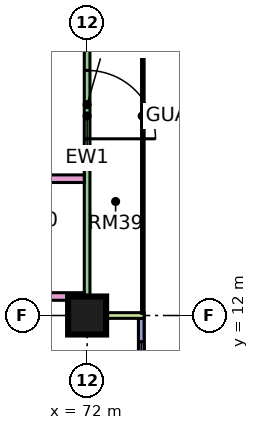
"""IFC4 building model, lengths in metres.
Left out: names, types, materials, properties, quantities, classifications, styles, units other than length and angle.
Written with IfcOpenShell. Run it as: python <this file> out.ifc"""

import sys

from ifc_helpers import new_model, si_unit, direction, frame, frame_2d, origin, origin_2d, place, context, subcontext, project, spatial, rectangle, extrude, element, fill, save


model = new_model("IFC4")
c1 = context("Model", 3, precision=1e-05, world=origin(), true_north=direction((0.0, 1.0)))
c2 = subcontext(c1, "Body", "Model", "MODEL_VIEW")
j1 = project(units=[si_unit("LENGTHUNIT", "METRE"), si_unit("PLANEANGLEUNIT", "RADIAN")], contexts=[c1])
p1 = place(None, origin())
s1 = spatial("IfcSite", under=j1, at=p1, CompositionType="ELEMENT")
p2 = place(p1, origin())
s2 = spatial("IfcBuilding", under=s1, at=p2, CompositionType="ELEMENT")
p3 = place(p2, frame((0.0, 0.0, 99.4)))
s3 = spatial("IfcBuildingStorey", under=s2, at=p3, CompositionType="ELEMENT", Elevation=99.4)
p4 = place(p3, frame((72.0, 12.0, 0.0), z_axis=(0.0, 0.0, 1.0), x_axis=(1.0, 0.0, 0.0)))
e1 = element("IfcColumn", 1, at=p4, inside=s3, PredefinedType="COLUMN", context=c2, shape_type="SweptSolid", body=[
    extrude(rectangle(XDim=1.0, YDim=1.0, at=origin_2d()), origin(), (0.0, 0.0, 1.0), 3.75),
])
p5 = place(p3, frame((73.425, 1.5, 0.0), z_axis=(0.0, 0.0, 1.0), x_axis=(0.0, 1.0, 0.0)))
e2 = element("IfcWall", 2, at=p5, inside=s3, PredefinedType="SOLIDWALL", context=c2, shape_type="SweptSolid", body=[
    extrude(rectangle(XDim=10.425, YDim=0.15, at=frame_2d((5.212, 0.0))), origin(), (0.0, 0.0, 1.0), 3.35),
])
p6 = place(p5, frame((1.3, 0.0, 0.45)))
e3 = element("IfcOpeningElement", 3, at=p6, cuts=e2, PredefinedType="OPENING", context=c2, shape_type="SweptSolid", body=[
    extrude(rectangle(XDim=3.0, YDim=2.4, at=frame_2d((1.5, 1.2))), frame((0.0, 0.085, 0.0), z_axis=(0.0, -1.0, 0.0), x_axis=(1.0, 0.0, 0.0)), (0.0, 0.0, 1.0), 0.17),
])
p7 = place(p5, frame((7.413, 0.0, 0.45)))
e4 = element("IfcOpeningElement", 4, at=p7, cuts=e2, PredefinedType="OPENING", context=c2, shape_type="SweptSolid", body=[
    extrude(rectangle(XDim=2.4, YDim=2.4, at=frame_2d((1.2, 1.2))), frame((0.0, 0.085, 0.0), z_axis=(0.0, -1.0, 0.0), x_axis=(1.0, 0.0, 0.0)), (0.0, 0.0, 1.0), 0.17),
])
p8 = place(p3, frame((72.0, 12.075, 0.0), z_axis=(0.0, 0.0, 1.0), x_axis=(0.0, 1.0, 0.0)))
e5 = element("IfcWall", 5, at=p8, inside=s3, PredefinedType="SOLIDWALL", context=c2, shape_type="SweptSolid", body=[
    extrude(rectangle(XDim=10.35, YDim=0.15, at=frame_2d((5.175, 0.0))), origin(), (0.0, 0.0, 1.0), 3.35),
])
p9 = place(p8, frame((4.575, 0.0, 0.0)))
e6 = element("IfcOpeningElement", 6, at=p9, cuts=e5, PredefinedType="OPENING", context=c2, shape_type="SweptSolid", body=[
    extrude(rectangle(XDim=1.8, YDim=2.4, at=frame_2d((0.9, 1.2))), frame((0.0, 0.085, 0.0), z_axis=(0.0, -1.0, 0.0), x_axis=(1.0, 0.0, 0.0)), (0.0, 0.0, 1.0), 0.17),
])
p10 = place(p8, frame((7.988, 0.0, 0.45)))
e7 = element("IfcOpeningElement", 7, at=p10, cuts=e5, PredefinedType="OPENING", context=c2, shape_type="SweptSolid", body=[
    extrude(rectangle(XDim=1.8, YDim=2.4, at=frame_2d((0.9, 1.2))), frame((0.0, 0.085, 0.0), z_axis=(0.0, -1.0, 0.0), x_axis=(1.0, 0.0, 0.0)), (0.0, 0.0, 1.0), 0.17),
])
p11 = place(p3, frame((73.5, 12.0, 0.0), z_axis=(0.0, 0.0, 1.0), x_axis=(-1.0, 0.0, 0.0)))
e8 = element("IfcWall", 8, at=p11, inside=s3, PredefinedType="SOLIDWALL", context=c2, shape_type="SweptSolid", body=[
    extrude(rectangle(XDim=1.5, YDim=0.15, at=frame_2d((0.75, 0.0))), origin(), (0.0, 0.0, 1.0), 3.35),
])
p12 = place(p3, frame((40.65, 12.5, 0.0), z_axis=(0.0, 0.0, 1.0), x_axis=(1.0, 0.0, 0.0)))
e9 = element("IfcWall", 9, at=p12, inside=s3, PredefinedType="PARTITIONING", context=c2, shape_type="SweptSolid", body=[
    extrude(rectangle(XDim=31.276, YDim=0.2, at=frame_2d((15.638, 0.0))), origin(), (0.0, 0.0, 1.0), 3.35),
])
p13 = place(p12, frame((14.25, 0.0, 0.0)))
e10 = element("IfcOpeningElement", 10, at=p13, cuts=e9, PredefinedType="OPENING", context=c2, shape_type="SweptSolid", body=[
    extrude(rectangle(XDim=1.0, YDim=2.1, at=frame_2d((0.5, 1.05))), frame((0.0, 0.11, 0.0), z_axis=(0.0, -1.0, 0.0), x_axis=(1.0, 0.0, 0.0)), (0.0, 0.0, 1.0), 0.22),
])
p14 = place(p12, frame((1.05, 0.0, 0.0)))
e11 = element("IfcOpeningElement", 11, at=p14, cuts=e9, PredefinedType="OPENING", context=c2, shape_type="SweptSolid", body=[
    extrude(rectangle(XDim=1.0, YDim=2.1, at=frame_2d((0.5, 1.05))), frame((0.0, 0.11, 0.0), z_axis=(0.0, -1.0, 0.0), x_axis=(1.0, 0.0, 0.0)), (0.0, 0.0, 1.0), 0.22),
])
p15 = place(p3, frame((51.225, 15.6, 0.0), z_axis=(0.0, 0.0, 1.0), x_axis=(1.0, 0.0, 0.0)))
e12 = element("IfcWall", 12, at=p15, inside=s3, PredefinedType="PARTITIONING", context=c2, shape_type="SweptSolid", body=[
    extrude(rectangle(XDim=20.701, YDim=0.2, at=frame_2d((10.351, 0.0))), origin(), (0.0, 0.0, 1.0), 3.35),
])
p16 = place(p15, frame((18.425, 0.0, 0.0)))
e13 = element("IfcOpeningElement", 13, at=p16, cuts=e12, PredefinedType="OPENING", context=c2, shape_type="SweptSolid", body=[
    extrude(rectangle(XDim=1.0, YDim=2.1, at=frame_2d((0.5, 1.05))), frame((0.0, 0.11, 0.0), z_axis=(0.0, -1.0, 0.0), x_axis=(1.0, 0.0, 0.0)), (0.0, 0.0, 1.0), 0.22),
])
p17 = place(p15, frame((0.875, 0.0, 0.0)))
e14 = element("IfcOpeningElement", 14, at=p17, cuts=e12, PredefinedType="OPENING", context=c2, shape_type="SweptSolid", body=[
    extrude(rectangle(XDim=1.0, YDim=2.1, at=frame_2d((0.5, 1.05))), frame((0.0, 0.11, 0.0), z_axis=(0.0, -1.0, 0.0), x_axis=(1.0, 0.0, 0.0)), (0.0, 0.0, 1.0), 0.22),
])
p18 = place(p7, origin())
e15 = element("IfcWindow", 15, at=p18, inside=s3, PartitioningType="SINGLE_PANEL", PredefinedType="WINDOW", context=c2, shape_type="SweptSolid", body=[
    extrude(rectangle(XDim=2.4, YDim=2.4, at=frame_2d((1.2, 1.2))), frame((0.0, 0.03, 0.0), z_axis=(0.0, -1.0, 0.0), x_axis=(1.0, 0.0, 0.0)), (0.0, 0.0, 1.0), 0.06),
])
fill(e4, e15)
p19 = place(p9, frame((1.8, 0.0, 0.0), z_axis=(0.0, 0.0, 1.0), x_axis=(-1.0, 0.0, 0.0)))
e16 = element("IfcDoor", 16, at=p19, inside=s3, OperationType="DOUBLE_DOOR_SINGLE_SWING", PredefinedType="DOOR", context=c2, shape_type="SweptSolid", body=[
    extrude(rectangle(XDim=1.8, YDim=2.4, at=frame_2d((0.9, 1.2))), frame((0.0, 0.025, 0.0), z_axis=(0.0, -1.0, 0.0), x_axis=(1.0, 0.0, 0.0)), (0.0, 0.0, 1.0), 0.05),
])
fill(e6, e16)
save(model, sys.argv[1])
